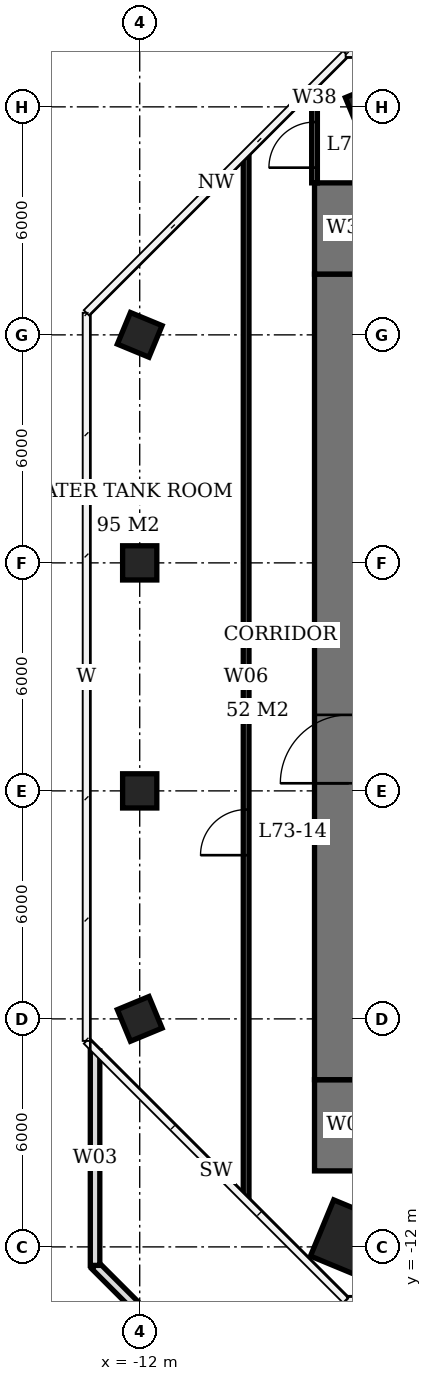
"""IFC4 building model, lengths in metres.
Left out: names, types, materials, properties, quantities, classifications, styles, units other than length and angle.
Written with IfcOpenShell. Run it as: python <this file> out.ifc"""

import sys

from ifc_helpers import new_model, si_unit, direction, frame, frame_2d, origin, origin_2d, place, context, subcontext, project, spatial, rectangle, extrude, element, fill, save


model = new_model("IFC4")
c1 = context("Model", 3, precision=1e-05, world=origin(), true_north=direction((0.0, 1.0)))
c2 = subcontext(c1, "Body", "Model", "MODEL_VIEW")
j1 = project(units=[si_unit("LENGTHUNIT", "METRE"), si_unit("PLANEANGLEUNIT", "RADIAN")], contexts=[c1])
p1 = place(None, origin())
s1 = spatial("IfcSite", under=j1, at=p1, CompositionType="ELEMENT")
p2 = place(p1, origin())
s2 = spatial("IfcBuilding", under=s1, at=p2, CompositionType="ELEMENT")
p3 = place(p2, frame((0.0, 0.0, 295.7)))
s3 = spatial("IfcBuildingStorey", under=s2, at=p3, CompositionType="ELEMENT", Elevation=295.7)
for number, where, z_axis, x_axis in (
    (1, (-12.0, -6.0, 0.0), (0.0, 0.0, 1.0), (-0.383, 0.924, 0.0)),
    (2, (-12.0, 0.0, 0.0), (0.0, 0.0, 1.0), (0.0, 1.0, 0.0)),
    (3, (-12.0, 6.0, 0.0), (0.0, 0.0, 1.0), (0.0, 1.0, 0.0)),
    (4, (-12.0, 12.0, 0.0), (0.0, 0.0, 1.0), (0.383, 0.924, 0.0)),
):
    element("IfcColumn", number, at=place(p3, frame(where, z_axis=z_axis, x_axis=x_axis)), inside=s3, PredefinedType="COLUMN", context=c2, shape_type="SweptSolid", body=[
        extrude(rectangle(XDim=0.9, YDim=0.9, at=origin_2d()), origin(), (0.0, 0.0, 1.0), 5.0),
    ])
p4 = place(p3, frame((-6.0, -12.0, 0.0), z_axis=(0.0, 0.0, 1.0), x_axis=(-0.923879532511, 0.382683432365, 0.0)))
e5 = element("IfcColumn", 5, at=p4, inside=s3, PredefinedType="COLUMN", context=c2, shape_type="SweptSolid", body=[
    extrude(rectangle(XDim=2.6, YDim=1.6, at=origin_2d()), origin(), (0.0, 0.0, 1.0), 5.0),
])
p5 = place(p3, frame((-6.0, 18.0, 0.0), z_axis=(0.0, 0.0, 1.0), x_axis=(0.923879532511, 0.382683432365, 0.0)))
e6 = element("IfcColumn", 6, at=p5, inside=s3, PredefinedType="COLUMN", context=c2, shape_type="SweptSolid", body=[
    extrude(rectangle(XDim=0.9, YDim=0.9, at=origin_2d()), origin(), (0.0, 0.0, 1.0), 5.0),
])
p6 = place(p3, frame((-6.5, -7.6, 0.0), z_axis=(0.0, 0.0, 1.0), x_axis=(0.0, 1.0, 0.0)))
e7 = element("IfcWall", 7, at=p6, inside=s3, PredefinedType="SHEAR", context=c2, shape_type="SweptSolid", body=[
    extrude(rectangle(XDim=21.2, YDim=1.8, at=frame_2d((10.6, 0.0))), origin(), (0.0, 0.0, 1.0), 5.0),
])
p7 = place(p6, frame((7.8, 0.0, 0.0)))
e8 = element("IfcOpeningElement", 8, at=p7, cuts=e7, PredefinedType="OPENING", context=c2, shape_type="SweptSolid", body=[
    extrude(rectangle(XDim=1.8, YDim=2.4, at=frame_2d((0.9, 1.2))), frame((0.0, 0.91, 0.0), z_axis=(0.0, -1.0, 0.0), x_axis=(1.0, 0.0, 0.0)), (0.0, 0.0, 1.0), 1.82),
])
for number, where, z_axis, x_axis in (
    (9, (-6.5, -10.0, 0.0), (0.0, 0.0, 1.0), (0.0, 1.0, 0.0)),
    (10, (-6.5, 13.6, 0.0), (0.0, 0.0, 1.0), (0.0, 1.0, 0.0)),
):
    element("IfcWall", number, at=place(p3, frame(where, z_axis=z_axis, x_axis=x_axis)), inside=s3, PredefinedType="SHEAR", context=c2, shape_type="SweptSolid", body=[
        extrude(rectangle(XDim=2.4, YDim=1.8, at=frame_2d((1.2, 0.0))), origin(), (0.0, 0.0, 1.0), 5.0),
    ])
p8 = place(p3, frame((-6.487, -19.175, 0.0), z_axis=(0.0, 0.0, 1.0), x_axis=(-0.707106781187, 0.707106781187, 0.0)))
e11 = element("IfcWall", 11, at=p8, inside=s3, PredefinedType="PARAPET", context=c2, shape_type="SweptSolid", body=[
    extrude(rectangle(XDim=9.458, YDim=0.25, at=frame_2d((4.729, 0.0))), origin(), (0.0, 0.0, 1.0), 1.1),
])
p9 = place(p3, frame((-13.175, -12.487, 0.0), z_axis=(0.0, 0.0, 1.0), x_axis=(0.0, 1.0, 0.0)))
e12 = element("IfcWall", 12, at=p9, inside=s3, PredefinedType="PARAPET", context=c2, shape_type="SweptSolid", body=[
    extrude(rectangle(XDim=5.646, YDim=0.25, at=frame_2d((2.823, 0.0))), origin(), (0.0, 0.0, 1.0), 1.1),
])
p10 = place(p3, frame((-9.2, -10.689, 0.0), z_axis=(0.0, 0.0, 1.0), x_axis=(0.0, 1.0, 0.0)))
e13 = element("IfcWall", 13, at=p10, inside=s3, PredefinedType="PARTITIONING", context=c2, shape_type="SweptSolid", body=[
    extrude(rectangle(XDim=27.378, YDim=0.15, at=frame_2d((13.689, 0.0))), origin(), (0.0, 0.0, 1.0), 4.75),
])
p11 = place(p10, frame((8.997, 0.0, 0.0)))
e14 = element("IfcOpeningElement", 14, at=p11, cuts=e13, PredefinedType="OPENING", context=c2, shape_type="SweptSolid", body=[
    extrude(rectangle(XDim=1.2, YDim=2.4, at=frame_2d((0.6, 1.2))), frame((0.0, 0.085, 0.0), z_axis=(0.0, -1.0, 0.0), x_axis=(1.0, 0.0, 0.0)), (0.0, 0.0, 1.0), 0.17),
])
p12 = place(p3, frame((-7.4, 16.0, 0.0), z_axis=(0.0, 0.0, 1.0), x_axis=(0.0, 1.0, 0.0)))
e15 = element("IfcWall", 15, at=p12, inside=s3, PredefinedType="PARTITIONING", context=c2, shape_type="SweptSolid", body=[
    extrude(rectangle(XDim=2.489, YDim=0.15, at=frame_2d((1.245, 0.0))), origin(), (0.0, 0.0, 1.0), 4.75),
])
p13 = place(p12, frame((0.4, 0.0, 0.0)))
e16 = element("IfcOpeningElement", 16, at=p13, cuts=e15, PredefinedType="OPENING", context=c2, shape_type="SweptSolid", body=[
    extrude(rectangle(XDim=1.2, YDim=2.4, at=frame_2d((0.6, 1.2))), frame((0.0, 0.085, 0.0), z_axis=(0.0, -1.0, 0.0), x_axis=(1.0, 0.0, 0.0)), (0.0, 0.0, 1.0), 0.17),
])
p14 = place(p7, origin())
e17 = element("IfcDoor", 17, at=p14, inside=s3, OperationType="DOUBLE_DOOR_SINGLE_SWING", PredefinedType="DOOR", context=c2, shape_type="SweptSolid", body=[
    extrude(rectangle(XDim=1.8, YDim=2.4, at=frame_2d((0.9, 1.2))), frame((0.0, 0.025, 0.0), z_axis=(0.0, -1.0, 0.0), x_axis=(1.0, 0.0, 0.0)), (0.0, 0.0, 1.0), 0.05),
])
fill(e8, e17)
p15 = place(p11, origin())
e18 = element("IfcDoor", 18, at=p15, inside=s3, OperationType="SINGLE_SWING_LEFT", PredefinedType="DOOR", context=c2, shape_type="SweptSolid", body=[
    extrude(rectangle(XDim=1.2, YDim=2.4, at=frame_2d((0.6, 1.2))), frame((0.0, 0.025, 0.0), z_axis=(0.0, -1.0, 0.0), x_axis=(1.0, 0.0, 0.0)), (0.0, 0.0, 1.0), 0.05),
])
fill(e14, e18)
p16 = place(p13, origin())
e19 = element("IfcDoor", 19, at=p16, inside=s3, OperationType="SINGLE_SWING_LEFT", PredefinedType="DOOR", context=c2, shape_type="SweptSolid", body=[
    extrude(rectangle(XDim=1.2, YDim=2.4, at=frame_2d((0.6, 1.2))), frame((0.0, 0.025, 0.0), z_axis=(0.0, -1.0, 0.0), x_axis=(1.0, 0.0, 0.0)), (0.0, 0.0, 1.0), 0.05),
])
fill(e16, e19)
save(model, sys.argv[1])
